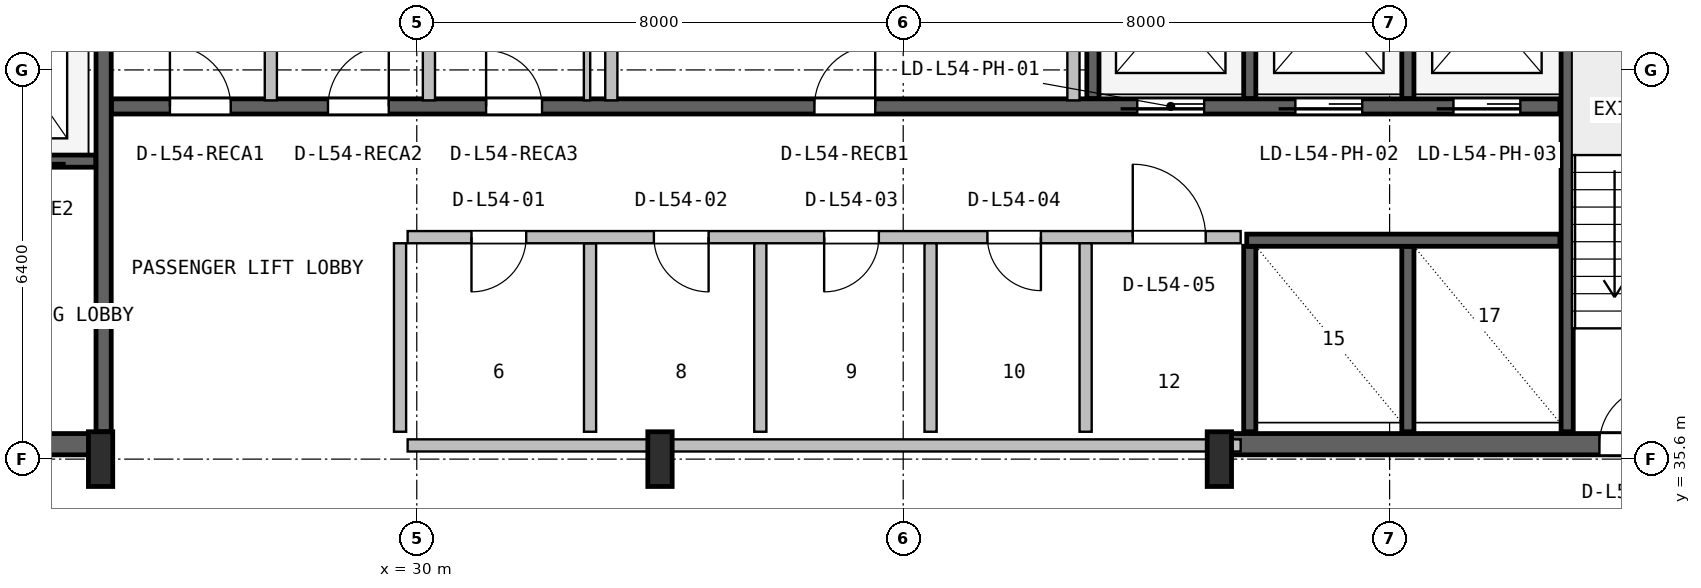
"""IFC4 building model, lengths in metres.
Left out: names, types, materials, properties, quantities, classifications, styles, units other than length and angle.
Written with IfcOpenShell. Run it as: python <this file> out.ifc"""

import sys

from ifc_helpers import new_model, si_unit, direction, frame, frame_2d, origin, origin_2d, place, context, subcontext, project, spatial, rectangle, i_section, extrude, source, transform, mapped, element, fill, save


model = new_model("IFC4")
c1 = context("Model", 3, precision=1e-05, world=origin(), true_north=direction((0.0, 1.0)))
c2 = subcontext(c1, "Body", "Model", "MODEL_VIEW")
j1 = project(units=[si_unit("LENGTHUNIT", "METRE"), si_unit("PLANEANGLEUNIT", "RADIAN")], contexts=[c1])
p1 = place(None, origin())
s1 = spatial("IfcSite", under=j1, at=p1, CompositionType="ELEMENT")
p2 = place(p1, origin())
s2 = spatial("IfcBuilding", under=s1, at=p2, CompositionType="ELEMENT")
p3 = place(p2, frame((0.0, 0.0, 218.8)))
s3 = spatial("IfcBuildingStorey", under=s2, at=p3, CompositionType="ELEMENT", Elevation=218.8)
p4 = place(p3, frame((15.67, 35.845, 0.0), z_axis=(0.0, 0.0, 1.0), x_axis=(1.0, 0.0, 0.0)))
e1 = element("IfcWall", 1, at=p4, inside=s3, PredefinedType="SHEAR", context=c2, shape_type="SweptSolid", body=[
    extrude(rectangle(XDim=9.13, YDim=0.35, at=frame_2d((4.565, 0.0))), origin(), (0.0, 0.0, 1.0), 3.55),
])
p5 = place(p4, frame((5.4, 0.0, 0.0)))
e2 = element("IfcOpeningElement", 2, at=p5, cuts=e1, PredefinedType="OPENING", context=c2, shape_type="SweptSolid", body=[
    extrude(rectangle(XDim=1.0, YDim=2.1, at=frame_2d((0.5, 1.05))), frame((0.0, 0.185, 0.0), z_axis=(0.0, -1.0, 0.0), x_axis=(1.0, 0.0, 0.0)), (0.0, 0.0, 1.0), 0.37),
])
p6 = place(p3, frame((43.2, 35.845, 0.0), z_axis=(0.0, 0.0, 1.0), x_axis=(1.0, 0.0, 0.0)))
e3 = element("IfcWall", 3, at=p6, inside=s3, PredefinedType="SHEAR", context=c2, shape_type="SweptSolid", body=[
    extrude(rectangle(XDim=9.13, YDim=0.35, at=frame_2d((4.565, 0.0))), origin(), (0.0, 0.0, 1.0), 3.55),
])
p7 = place(p6, frame((6.25, 0.0, 0.0)))
e4 = element("IfcOpeningElement", 4, at=p7, cuts=e3, PredefinedType="OPENING", context=c2, shape_type="SweptSolid", body=[
    extrude(rectangle(XDim=0.95, YDim=2.1, at=frame_2d((0.475, 1.05))), frame((0.0, 0.185, 0.0), z_axis=(0.0, -1.0, 0.0), x_axis=(1.0, 0.0, 0.0)), (0.0, 0.0, 1.0), 0.37),
])
m1 = source(origin(), c2, "Body", "SweptSolid", [
    extrude(i_section(OverallWidth=0.4, OverallDepth=0.9, WebThickness=0.016, FlangeThickness=0.028, FilletRadius=0.016, at=origin_2d()), origin(), (0.0, 0.0, 1.0), 3.8),
])
for number, where, z_axis, x_axis in (
    (5, (24.8, 35.6, 0.0), (0.0, 0.0, 1.0), (1.0, 0.0, 0.0)),
    (6, (34.0, 35.6, 0.0), (0.0, 0.0, 1.0), (1.0, 0.0, 0.0)),
    (7, (43.2, 35.6, 0.0), (0.0, 0.0, 1.0), (1.0, 0.0, 0.0)),
):
    element("IfcColumn", number, at=place(p3, frame(where, z_axis=z_axis, x_axis=x_axis)), inside=s3, PredefinedType="COLUMN", context=c2, shape_type="MappedRepresentation", body=[
        mapped(m1, transform((0.0, 0.0, 0.0), x_axis=(1.0, 0.0, 0.0), y_axis=(0.0, 1.0, 0.0), z_axis=(0.0, 0.0, 1.0), scale=1.0)),
    ])
p8 = place(p3, frame((24.85, 36.05, 0.0), z_axis=(0.0, 0.0, 1.0), x_axis=(0.0, 1.0, 0.0)))
e8 = element("IfcWall", 8, at=p8, inside=s3, PredefinedType="SHEAR", context=c2, shape_type="SweptSolid", body=[
    extrude(rectangle(XDim=10.45, YDim=0.25, at=frame_2d((5.225, 0.0))), origin(), (0.0, 0.0, 1.0), 3.55),
])
p9 = place(p3, frame((19.2, 40.5, 0.0), z_axis=(0.0, 0.0, 1.0), x_axis=(1.0, 0.0, 0.0)))
e9 = element("IfcWall", 9, at=p9, inside=s3, PredefinedType="SHEAR", context=c2, shape_type="SweptSolid", body=[
    extrude(rectangle(XDim=5.52, YDim=0.2, at=frame_2d((2.76, 0.0))), origin(), (0.0, 0.0, 1.0), 3.55),
])
p10 = place(p9, frame((1.05, 0.0, 0.0)))
e10 = element("IfcOpeningElement", 10, at=p10, cuts=e9, PredefinedType="OPENING", context=c2, shape_type="SweptSolid", body=[
    extrude(rectangle(XDim=1.1, YDim=2.18, at=frame_2d((0.55, 1.09))), frame((0.0, 0.11, 0.0), z_axis=(0.0, -1.0, 0.0), x_axis=(1.0, 0.0, 0.0)), (0.0, 0.0, 1.0), 0.22),
])
p11 = place(p9, frame((3.65, 0.0, 0.0)))
e11 = element("IfcOpeningElement", 11, at=p11, cuts=e9, PredefinedType="OPENING", context=c2, shape_type="SweptSolid", body=[
    extrude(rectangle(XDim=1.1, YDim=2.18, at=frame_2d((0.55, 1.09))), frame((0.0, 0.11, 0.0), z_axis=(0.0, -1.0, 0.0), x_axis=(1.0, 0.0, 0.0)), (0.0, 0.0, 1.0), 0.22),
])
p12 = place(p3, frame((48.92, 36.05, 0.0), z_axis=(0.0, 0.0, 1.0), x_axis=(0.0, 1.0, 0.0)))
e12 = element("IfcWall", 12, at=p12, inside=s3, PredefinedType="SHEAR", context=c2, shape_type="SweptSolid", body=[
    extrude(rectangle(XDim=10.5, YDim=0.2, at=frame_2d((5.25, 0.0))), origin(), (0.0, 0.0, 1.0), 3.55),
])
p13 = place(p3, frame((24.98, 41.4, 0.0), z_axis=(0.0, 0.0, 1.0), x_axis=(1.0, 0.0, 0.0)))
e13 = element("IfcWall", 13, at=p13, inside=s3, PredefinedType="SHEAR", context=c2, shape_type="SweptSolid", body=[
    extrude(rectangle(XDim=23.82, YDim=0.25, at=frame_2d((11.91, 0.0))), origin(), (0.0, 0.0, 1.0), 3.55),
])
p14 = place(p13, frame((16.87, 0.0, 0.0)))
e14 = element("IfcOpeningElement", 14, at=p14, cuts=e13, PredefinedType="OPENING", context=c2, shape_type="SweptSolid", body=[
    extrude(rectangle(XDim=1.1, YDim=2.18, at=frame_2d((0.55, 1.09))), frame((0.0, 0.135, 0.0), z_axis=(0.0, -1.0, 0.0), x_axis=(1.0, 0.0, 0.0)), (0.0, 0.0, 1.0), 0.27),
])
p15 = place(p13, frame((19.47, 0.0, 0.0)))
e15 = element("IfcOpeningElement", 15, at=p15, cuts=e13, PredefinedType="OPENING", context=c2, shape_type="SweptSolid", body=[
    extrude(rectangle(XDim=1.1, YDim=2.18, at=frame_2d((0.55, 1.09))), frame((0.0, 0.135, 0.0), z_axis=(0.0, -1.0, 0.0), x_axis=(1.0, 0.0, 0.0)), (0.0, 0.0, 1.0), 0.27),
])
p16 = place(p13, frame((22.07, 0.0, 0.0)))
e16 = element("IfcOpeningElement", 16, at=p16, cuts=e13, PredefinedType="OPENING", context=c2, shape_type="SweptSolid", body=[
    extrude(rectangle(XDim=1.1, YDim=2.18, at=frame_2d((0.55, 1.09))), frame((0.0, 0.135, 0.0), z_axis=(0.0, -1.0, 0.0), x_axis=(1.0, 0.0, 0.0)), (0.0, 0.0, 1.0), 0.27),
])
p17 = place(p13, frame((0.96, 0.0, 0.0)))
e17 = element("IfcOpeningElement", 17, at=p17, cuts=e13, PredefinedType="OPENING", context=c2, shape_type="SweptSolid", body=[
    extrude(rectangle(XDim=1.0, YDim=2.08, at=frame_2d((0.5, 1.04))), frame((0.0, 0.135, 0.0), z_axis=(0.0, -1.0, 0.0), x_axis=(1.0, 0.0, 0.0)), (0.0, 0.0, 1.0), 0.27),
])
p18 = place(p13, frame((3.56, 0.0, 0.0)))
e18 = element("IfcOpeningElement", 18, at=p18, cuts=e13, PredefinedType="OPENING", context=c2, shape_type="SweptSolid", body=[
    extrude(rectangle(XDim=1.0, YDim=2.08, at=frame_2d((0.5, 1.04))), frame((0.0, 0.135, 0.0), z_axis=(0.0, -1.0, 0.0), x_axis=(1.0, 0.0, 0.0)), (0.0, 0.0, 1.0), 0.27),
])
p19 = place(p13, frame((6.16, 0.0, 0.0)))
e19 = element("IfcOpeningElement", 19, at=p19, cuts=e13, PredefinedType="OPENING", context=c2, shape_type="SweptSolid", body=[
    extrude(rectangle(XDim=0.92, YDim=2.08, at=frame_2d((0.46, 1.04))), frame((0.0, 0.135, 0.0), z_axis=(0.0, -1.0, 0.0), x_axis=(1.0, 0.0, 0.0)), (0.0, 0.0, 1.0), 0.27),
])
p20 = place(p13, frame((11.56, 0.0, 0.0)))
e20 = element("IfcOpeningElement", 20, at=p20, cuts=e13, PredefinedType="OPENING", context=c2, shape_type="SweptSolid", body=[
    extrude(rectangle(XDim=1.0, YDim=2.08, at=frame_2d((0.5, 1.04))), frame((0.0, 0.135, 0.0), z_axis=(0.0, -1.0, 0.0), x_axis=(1.0, 0.0, 0.0)), (0.0, 0.0, 1.0), 0.27),
])
p21 = place(p3, frame((41.12, 41.53, 0.0), z_axis=(0.0, 0.0, 1.0), x_axis=(0.0, 1.0, 0.0)))
e21 = element("IfcWall", 21, at=p21, inside=s3, PredefinedType="SHEAR", context=c2, shape_type="SweptSolid", body=[
    extrude(rectangle(XDim=5.02, YDim=0.2, at=frame_2d((2.51, 0.0))), origin(), (0.0, 0.0, 1.0), 3.55),
])
for number, where, z_axis, x_axis in (
    (22, (43.7, 41.53, 0.0), (0.0, 0.0, 1.0), (0.0, 1.0, 0.0)),
    (23, (46.3, 41.53, 0.0), (0.0, 0.0, 1.0), (0.0, 1.0, 0.0)),
):
    element("IfcWall", number, at=place(p3, frame(where, z_axis=z_axis, x_axis=x_axis)), inside=s3, PredefinedType="SHEAR", context=c2, shape_type="SweptSolid", body=[
        extrude(rectangle(XDim=2.87, YDim=0.2, at=frame_2d((1.435, 0.0))), origin(), (0.0, 0.0, 1.0), 3.55),
    ])
for number, where, z_axis, x_axis in (
    (24, (43.7, 36.05, 0.0), (0.0, 0.0, 1.0), (0.0, 1.0, 0.0)),
    (25, (46.3, 36.05, 0.0), (0.0, 0.0, 1.0), (0.0, 1.0, 0.0)),
):
    element("IfcWall", number, at=place(p3, frame(where, z_axis=z_axis, x_axis=x_axis)), inside=s3, PredefinedType="SHEAR", context=c2, shape_type="SweptSolid", body=[
        extrude(rectangle(XDim=3.05, YDim=0.2, at=frame_2d((1.525, 0.0))), origin(), (0.0, 0.0, 1.0), 3.55),
    ])
p22 = place(p3, frame((43.65, 39.2, 0.0), z_axis=(0.0, 0.0, 1.0), x_axis=(1.0, 0.0, 0.0)))
e26 = element("IfcWall", 26, at=p22, inside=s3, PredefinedType="SHEAR", context=c2, shape_type="SweptSolid", body=[
    extrude(rectangle(XDim=5.15, YDim=0.2, at=frame_2d((2.575, 0.0))), origin(), (0.0, 0.0, 1.0), 3.55),
])
p23 = place(p3, frame((29.85, 35.825, 0.0), z_axis=(0.0, 0.0, 1.0), x_axis=(1.0, 0.0, 0.0)))
e27 = element("IfcWall", 27, at=p23, inside=s3, PredefinedType="SOLIDWALL", context=c2, shape_type="SweptSolid", body=[
    extrude(rectangle(XDim=13.7, YDim=0.2, at=frame_2d((6.85, 0.0))), origin(), (0.0, 0.0, 1.0), 2.575),
])
p24 = place(p3, frame((32.85, 36.05, 0.0), z_axis=(0.0, 0.0, 1.0), x_axis=(0.0, 1.0, 0.0)))
e28 = element("IfcWall", 28, at=p24, inside=s3, PredefinedType="PLUMBINGWALL", context=c2, shape_type="SweptSolid", body=[
    extrude(rectangle(XDim=3.1, YDim=0.2, at=frame_2d((1.55, 0.0))), origin(), (0.0, 0.0, 1.0), 3.53),
])
p25 = place(p3, frame((29.85, 39.25, 0.0), z_axis=(0.0, 0.0, 1.0), x_axis=(1.0, 0.0, 0.0)))
e29 = element("IfcWall", 29, at=p25, inside=s3, PredefinedType="SOLIDWALL", context=c2, shape_type="SweptSolid", body=[
    extrude(rectangle(XDim=13.7, YDim=0.2, at=frame_2d((6.85, 0.0))), origin(), (0.0, 0.0, 1.0), 3.53),
])
p26 = place(p25, frame((1.05, 0.0, 0.0)))
e30 = element("IfcOpeningElement", 30, at=p26, cuts=e29, PredefinedType="OPENING", context=c2, shape_type="SweptSolid", body=[
    extrude(rectangle(XDim=0.9, YDim=2.06, at=frame_2d((0.45, 1.03))), frame((0.0, 0.11, 0.0), z_axis=(0.0, -1.0, 0.0), x_axis=(1.0, 0.0, 0.0)), (0.0, 0.0, 1.0), 0.22),
])
p27 = place(p25, frame((4.05, 0.0, 0.0)))
e31 = element("IfcOpeningElement", 31, at=p27, cuts=e29, PredefinedType="OPENING", context=c2, shape_type="SweptSolid", body=[
    extrude(rectangle(XDim=0.9, YDim=2.06, at=frame_2d((0.45, 1.03))), frame((0.0, 0.11, 0.0), z_axis=(0.0, -1.0, 0.0), x_axis=(1.0, 0.0, 0.0)), (0.0, 0.0, 1.0), 0.22),
])
p28 = place(p25, frame((6.85, 0.0, 0.0)))
e32 = element("IfcOpeningElement", 32, at=p28, cuts=e29, PredefinedType="OPENING", context=c2, shape_type="SweptSolid", body=[
    extrude(rectangle(XDim=0.9, YDim=2.06, at=frame_2d((0.45, 1.03))), frame((0.0, 0.11, 0.0), z_axis=(0.0, -1.0, 0.0), x_axis=(1.0, 0.0, 0.0)), (0.0, 0.0, 1.0), 0.22),
])
p29 = place(p25, frame((9.535, 0.0, 0.0)))
e33 = element("IfcOpeningElement", 33, at=p29, cuts=e29, PredefinedType="OPENING", context=c2, shape_type="SweptSolid", body=[
    extrude(rectangle(XDim=0.88, YDim=2.06, at=frame_2d((0.44, 1.03))), frame((0.0, 0.11, 0.0), z_axis=(0.0, -1.0, 0.0), x_axis=(1.0, 0.0, 0.0)), (0.0, 0.0, 1.0), 0.22),
])
p30 = place(p25, frame((11.925, 0.0, 0.0)))
e34 = element("IfcOpeningElement", 34, at=p30, cuts=e29, PredefinedType="OPENING", context=c2, shape_type="SweptSolid", body=[
    extrude(rectangle(XDim=1.2, YDim=2.1, at=frame_2d((0.6, 1.05))), frame((0.0, 0.11, 0.0), z_axis=(0.0, -1.0, 0.0), x_axis=(1.0, 0.0, 0.0)), (0.0, 0.0, 1.0), 0.22),
])
for number, where, z_axis, x_axis in (
    (35, (29.725, 36.05, 0.0), (0.0, 0.0, 1.0), (0.0, 1.0, 0.0)),
    (36, (35.65, 36.05, 0.0), (0.0, 0.0, 1.0), (0.0, 1.0, 0.0)),
    (37, (38.45, 36.05, 0.0), (0.0, 0.0, 1.0), (0.0, 1.0, 0.0)),
):
    element("IfcWall", number, at=place(p3, frame(where, z_axis=z_axis, x_axis=x_axis)), inside=s3, PredefinedType="PLUMBINGWALL", context=c2, shape_type="SweptSolid", body=[
        extrude(rectangle(XDim=3.1, YDim=0.2, at=frame_2d((1.55, 0.0))), origin(), (0.0, 0.0, 1.0), 3.53),
    ])
p31 = place(p3, frame((41.0, 36.05, 0.0), z_axis=(0.0, 0.0, 1.0), x_axis=(0.0, 1.0, 0.0)))
e38 = element("IfcWall", 38, at=p31, inside=s3, PredefinedType="SOLIDWALL", context=c2, shape_type="SweptSolid", body=[
    extrude(rectangle(XDim=3.1, YDim=0.2, at=frame_2d((1.55, 0.0))), origin(), (0.0, 0.0, 1.0), 3.53),
])
for number, where, z_axis, x_axis in (
    (39, (27.6, 41.5, 0.0), (0.0, 0.0, 1.0), (0.0, 1.0, 0.0)),
    (40, (30.2, 41.5, 0.0), (0.0, 0.0, 1.0), (0.0, 1.0, 0.0)),
):
    element("IfcWall", number, at=place(p3, frame(where, z_axis=z_axis, x_axis=x_axis)), inside=s3, PredefinedType="SOLIDWALL", context=c2, shape_type="SweptSolid", body=[
        extrude(rectangle(XDim=5.02, YDim=0.2, at=frame_2d((2.51, 0.0))), origin(), (0.0, 0.0, 1.0), 3.53),
    ])
p32 = place(p3, frame((32.8, 41.5, 0.0), z_axis=(0.0, 0.0, 1.0), x_axis=(0.0, 1.0, 0.0)))
e41 = element("IfcWall", 41, at=p32, inside=s3, PredefinedType="PARTITIONING", context=c2, shape_type="SweptSolid", body=[
    extrude(rectangle(XDim=5.02, YDim=0.105, at=frame_2d((2.51, 0.0))), origin(), (0.0, 0.0, 1.0), 3.53),
])
for number, where, z_axis, x_axis in (
    (42, (40.8, 41.5, 0.0), (0.0, 0.0, 1.0), (0.0, 1.0, 0.0)),
    (43, (33.2, 41.5, 0.0), (0.0, 0.0, 1.0), (0.0, 1.0, 0.0)),
):
    element("IfcWall", number, at=place(p3, frame(where, z_axis=z_axis, x_axis=x_axis)), inside=s3, PredefinedType="SOLIDWALL", context=c2, shape_type="SweptSolid", body=[
        extrude(rectangle(XDim=5.02, YDim=0.2, at=frame_2d((2.51, 0.0))), origin(), (0.0, 0.0, 1.0), 3.53),
    ])
m2 = source(origin(), c2, "Body", "SweptSolid", [
    extrude(rectangle(XDim=0.95, YDim=2.1, at=frame_2d((0.475, 1.05))), frame((0.0, 0.025, 0.0), z_axis=(0.0, -1.0, 0.0), x_axis=(1.0, 0.0, 0.0)), (0.0, 0.0, 1.0), 0.05),
])
p33 = place(p7, origin())
e44 = element("IfcDoor", 44, at=p33, inside=s3, OperationType="SINGLE_SWING_RIGHT", PredefinedType="DOOR", context=c2, shape_type="MappedRepresentation", body=[
    mapped(m2, transform((0.0, 0.0, 0.0), x_axis=(1.0, 0.0, 0.0), y_axis=(0.0, 1.0, 0.0), z_axis=(0.0, 0.0, 1.0), scale=1.0)),
])
fill(e4, e44)
m3 = source(origin(), c2, "Body", "SweptSolid", [
    extrude(rectangle(XDim=1.1, YDim=2.18, at=frame_2d((0.55, 1.09))), frame((0.0, 0.025, 0.0), z_axis=(0.0, -1.0, 0.0), x_axis=(1.0, 0.0, 0.0)), (0.0, 0.0, 1.0), 0.05),
])
p34 = place(p14, frame((1.1, 0.0, 0.0), z_axis=(0.0, 0.0, 1.0), x_axis=(-1.0, 0.0, 0.0)))
e45 = element("IfcDoor", 45, at=p34, inside=s3, OperationType="SLIDING_TO_LEFT", PredefinedType="DOOR", context=c2, shape_type="MappedRepresentation", body=[
    mapped(m3, transform((0.0, 0.0, 0.0), x_axis=(1.0, 0.0, 0.0), y_axis=(0.0, 1.0, 0.0), z_axis=(0.0, 0.0, 1.0), scale=1.0)),
])
fill(e14, e45)
p35 = place(p15, frame((1.1, 0.0, 0.0), z_axis=(0.0, 0.0, 1.0), x_axis=(-1.0, 0.0, 0.0)))
e46 = element("IfcDoor", 46, at=p35, inside=s3, OperationType="SLIDING_TO_LEFT", PredefinedType="DOOR", context=c2, shape_type="MappedRepresentation", body=[
    mapped(m3, transform((0.0, 0.0, 0.0), x_axis=(1.0, 0.0, 0.0), y_axis=(0.0, 1.0, 0.0), z_axis=(0.0, 0.0, 1.0), scale=1.0)),
])
fill(e15, e46)
p36 = place(p16, frame((1.1, 0.0, 0.0), z_axis=(0.0, 0.0, 1.0), x_axis=(-1.0, 0.0, 0.0)))
e47 = element("IfcDoor", 47, at=p36, inside=s3, OperationType="SLIDING_TO_LEFT", PredefinedType="DOOR", context=c2, shape_type="MappedRepresentation", body=[
    mapped(m3, transform((0.0, 0.0, 0.0), x_axis=(1.0, 0.0, 0.0), y_axis=(0.0, 1.0, 0.0), z_axis=(0.0, 0.0, 1.0), scale=1.0)),
])
fill(e16, e47)
m4 = source(origin(), c2, "Body", "SweptSolid", [
    extrude(rectangle(XDim=1.0, YDim=2.08, at=frame_2d((0.5, 1.04))), frame((0.0, 0.025, 0.0), z_axis=(0.0, -1.0, 0.0), x_axis=(1.0, 0.0, 0.0)), (0.0, 0.0, 1.0), 0.05),
])
p37 = place(p17, origin())
e48 = element("IfcDoor", 48, at=p37, inside=s3, OperationType="SINGLE_SWING_LEFT", PredefinedType="DOOR", context=c2, shape_type="MappedRepresentation", body=[
    mapped(m4, transform((0.0, 0.0, 0.0), x_axis=(1.0, 0.0, 0.0), y_axis=(0.0, 1.0, 0.0), z_axis=(0.0, 0.0, 1.0), scale=1.0)),
])
fill(e17, e48)
p38 = place(p18, origin())
e49 = element("IfcDoor", 49, at=p38, inside=s3, OperationType="SINGLE_SWING_RIGHT", PredefinedType="DOOR", context=c2, shape_type="MappedRepresentation", body=[
    mapped(m4, transform((0.0, 0.0, 0.0), x_axis=(1.0, 0.0, 0.0), y_axis=(0.0, 1.0, 0.0), z_axis=(0.0, 0.0, 1.0), scale=1.0)),
])
fill(e18, e49)
m5 = source(origin(), c2, "Body", "SweptSolid", [
    extrude(rectangle(XDim=0.92, YDim=2.08, at=frame_2d((0.46, 1.04))), frame((0.0, 0.025, 0.0), z_axis=(0.0, -1.0, 0.0), x_axis=(1.0, 0.0, 0.0)), (0.0, 0.0, 1.0), 0.05),
])
p39 = place(p19, origin())
e50 = element("IfcDoor", 50, at=p39, inside=s3, OperationType="SINGLE_SWING_LEFT", PredefinedType="DOOR", context=c2, shape_type="MappedRepresentation", body=[
    mapped(m5, transform((0.0, 0.0, 0.0), x_axis=(1.0, 0.0, 0.0), y_axis=(0.0, 1.0, 0.0), z_axis=(0.0, 0.0, 1.0), scale=1.0)),
])
fill(e19, e50)
p40 = place(p20, origin())
e51 = element("IfcDoor", 51, at=p40, inside=s3, OperationType="SINGLE_SWING_RIGHT", PredefinedType="DOOR", context=c2, shape_type="MappedRepresentation", body=[
    mapped(m4, transform((0.0, 0.0, 0.0), x_axis=(1.0, 0.0, 0.0), y_axis=(0.0, 1.0, 0.0), z_axis=(0.0, 0.0, 1.0), scale=1.0)),
])
fill(e20, e51)
m6 = source(origin(), c2, "Body", "SweptSolid", [
    extrude(rectangle(XDim=0.9, YDim=2.06, at=frame_2d((0.45, 1.03))), frame((0.0, 0.025, 0.0), z_axis=(0.0, -1.0, 0.0), x_axis=(1.0, 0.0, 0.0)), (0.0, 0.0, 1.0), 0.05),
])
p41 = place(p26, frame((0.9, 0.0, 0.0), z_axis=(0.0, 0.0, 1.0), x_axis=(-1.0, 0.0, 0.0)))
e52 = element("IfcDoor", 52, at=p41, inside=s3, OperationType="SINGLE_SWING_LEFT", PredefinedType="DOOR", context=c2, shape_type="MappedRepresentation", body=[
    mapped(m6, transform((0.0, 0.0, 0.0), x_axis=(1.0, 0.0, 0.0), y_axis=(0.0, 1.0, 0.0), z_axis=(0.0, 0.0, 1.0), scale=1.0)),
])
fill(e30, e52)
p42 = place(p27, frame((0.9, 0.0, 0.0), z_axis=(0.0, 0.0, 1.0), x_axis=(-1.0, 0.0, 0.0)))
e53 = element("IfcDoor", 53, at=p42, inside=s3, OperationType="SINGLE_SWING_RIGHT", PredefinedType="DOOR", context=c2, shape_type="MappedRepresentation", body=[
    mapped(m6, transform((0.0, 0.0, 0.0), x_axis=(1.0, 0.0, 0.0), y_axis=(0.0, 1.0, 0.0), z_axis=(0.0, 0.0, 1.0), scale=1.0)),
])
fill(e31, e53)
p43 = place(p28, frame((0.9, 0.0, 0.0), z_axis=(0.0, 0.0, 1.0), x_axis=(-1.0, 0.0, 0.0)))
e54 = element("IfcDoor", 54, at=p43, inside=s3, OperationType="SINGLE_SWING_LEFT", PredefinedType="DOOR", context=c2, shape_type="MappedRepresentation", body=[
    mapped(m6, transform((0.0, 0.0, 0.0), x_axis=(1.0, 0.0, 0.0), y_axis=(0.0, 1.0, 0.0), z_axis=(0.0, 0.0, 1.0), scale=1.0)),
])
fill(e32, e54)
m7 = source(origin(), c2, "Body", "SweptSolid", [
    extrude(rectangle(XDim=0.88, YDim=2.06, at=frame_2d((0.44, 1.03))), frame((0.0, 0.025, 0.0), z_axis=(0.0, -1.0, 0.0), x_axis=(1.0, 0.0, 0.0)), (0.0, 0.0, 1.0), 0.05),
])
p44 = place(p29, frame((0.88, 0.0, 0.0), z_axis=(0.0, 0.0, 1.0), x_axis=(-1.0, 0.0, 0.0)))
e55 = element("IfcDoor", 55, at=p44, inside=s3, OperationType="SINGLE_SWING_RIGHT", PredefinedType="DOOR", context=c2, shape_type="MappedRepresentation", body=[
    mapped(m7, transform((0.0, 0.0, 0.0), x_axis=(1.0, 0.0, 0.0), y_axis=(0.0, 1.0, 0.0), z_axis=(0.0, 0.0, 1.0), scale=1.0)),
])
fill(e33, e55)
m8 = source(origin(), c2, "Body", "SweptSolid", [
    extrude(rectangle(XDim=1.2, YDim=2.1, at=frame_2d((0.6, 1.05))), frame((0.0, 0.025, 0.0), z_axis=(0.0, -1.0, 0.0), x_axis=(1.0, 0.0, 0.0)), (0.0, 0.0, 1.0), 0.05),
])
p45 = place(p30, origin())
e56 = element("IfcDoor", 56, at=p45, inside=s3, OperationType="SINGLE_SWING_LEFT", PredefinedType="DOOR", context=c2, shape_type="MappedRepresentation", body=[
    mapped(m8, transform((0.0, 0.0, 0.0), x_axis=(1.0, 0.0, 0.0), y_axis=(0.0, 1.0, 0.0), z_axis=(0.0, 0.0, 1.0), scale=1.0)),
])
fill(e34, e56)
save(model, sys.argv[1])
